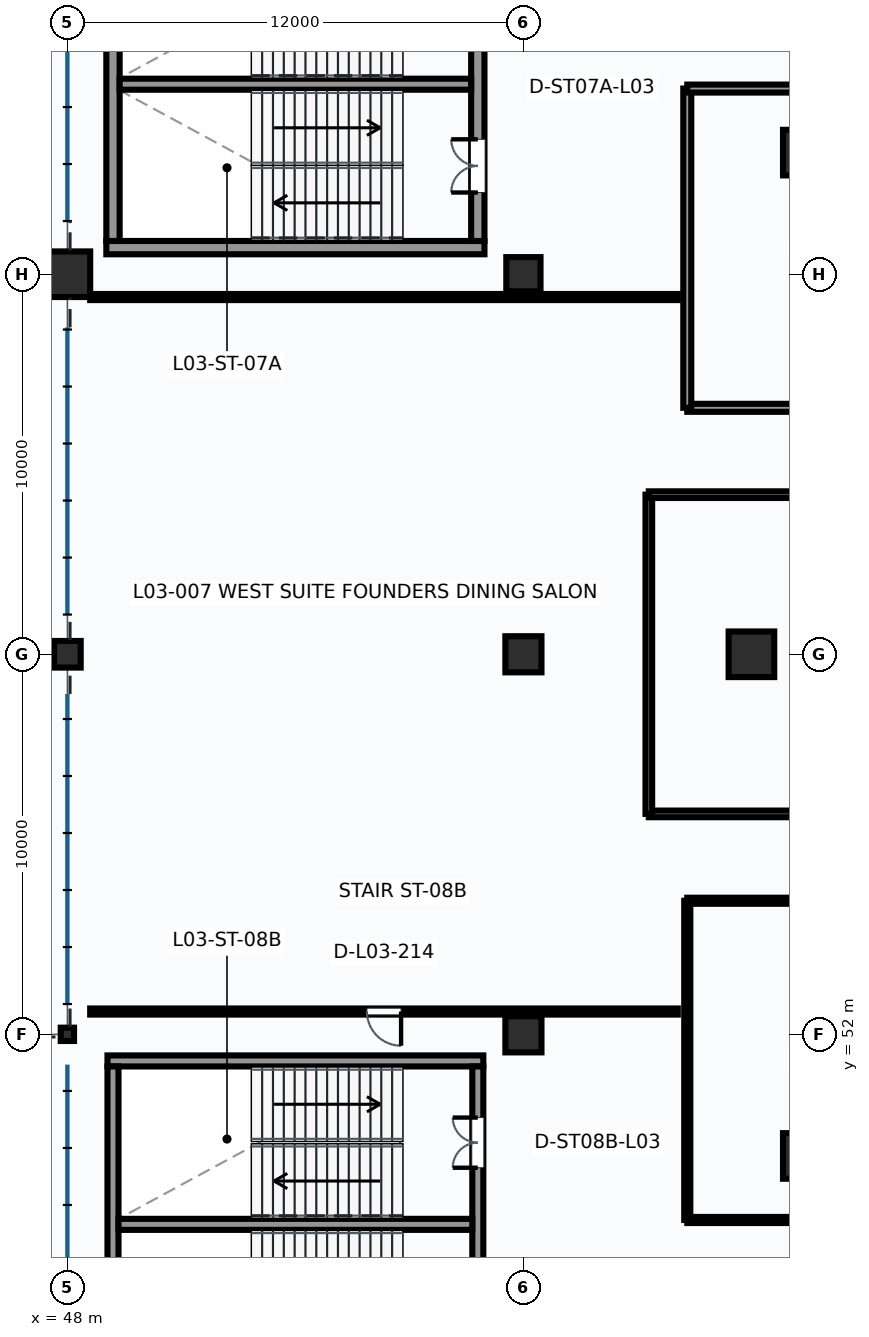
"""IFC4 building model, lengths in metres.
Left out: names, types, materials, properties, quantities, classifications, styles, units other than length and angle.
Written with IfcOpenShell. Run it as: python <this file> out.ifc"""

import sys

from ifc_helpers import new_model, si_unit, direction, frame, frame_2d, origin, origin_2d, place, context, subcontext, project, spatial, rectangle, hollow_rectangle, circle, extrude, element, fill, save


model = new_model("IFC4")
c1 = context("Model", 3, precision=1e-05, world=origin(), true_north=direction((0.0, 1.0)))
c2 = subcontext(c1, "Body", "Model", "MODEL_VIEW")
j1 = project(units=[si_unit("LENGTHUNIT", "METRE"), si_unit("PLANEANGLEUNIT", "RADIAN")], contexts=[c1])
p1 = place(None, origin())
s1 = spatial("IfcSite", under=j1, at=p1, CompositionType="ELEMENT")
p2 = place(p1, origin())
s2 = spatial("IfcBuilding", under=s1, at=p2, CompositionType="ELEMENT")
p3 = place(p2, frame((0.0, 0.0, 14.7)))
s3 = spatial("IfcBuildingStorey", under=s2, at=p3, CompositionType="ELEMENT", Elevation=14.7)
p4 = place(p3, frame((48.0, 52.0, 0.0), z_axis=(0.0, 0.0, 1.0), x_axis=(1.0, 0.0, 0.0)))
e1 = element("IfcColumn", 1, at=p4, inside=s3, PredefinedType="COLUMN", context=c2, shape_type="SweptSolid", body=[
    extrude(hollow_rectangle(XDim=0.35, YDim=0.35, WallThickness=0.016, InnerFilletRadius=0.016, OuterFilletRadius=0.032, at=origin_2d()), origin(), (0.0, 0.0, 1.0), 4.5),
])
p5 = place(p3, frame((48.0, 62.0, 0.0), z_axis=(0.0, 0.0, 1.0), x_axis=(1.0, 0.0, 0.0)))
e2 = element("IfcColumn", 2, at=p5, inside=s3, PredefinedType="COLUMN", context=c2, shape_type="SweptSolid", body=[
    extrude(circle(Radius=0.35, at=origin_2d()), origin(), (0.0, 0.0, 1.0), 4.5),
])
p6 = place(p3, frame((48.0, 72.0, 0.0), z_axis=(0.0, 0.0, 1.0), x_axis=(1.0, 0.0, 0.0)))
e3 = element("IfcColumn", 3, at=p6, inside=s3, PredefinedType="COLUMN", context=c2, shape_type="SweptSolid", body=[
    extrude(rectangle(XDim=1.2, YDim=1.2, at=origin_2d()), origin(), (0.0, 0.0, 1.0), 4.5),
])
for number, where, z_axis, x_axis in (
    (4, (60.0, 52.0, 0.0), (0.0, 0.0, 1.0), (1.0, 0.0, 0.0)),
    (5, (60.0, 62.0, 0.0), (0.0, 0.0, 1.0), (1.0, 0.0, 0.0)),
):
    element("IfcColumn", number, at=place(p3, frame(where, z_axis=z_axis, x_axis=x_axis)), inside=s3, PredefinedType="COLUMN", context=c2, shape_type="SweptSolid", body=[
        extrude(rectangle(XDim=0.95, YDim=0.95, at=origin_2d()), origin(), (0.0, 0.0, 1.0), 4.5),
    ])
p7 = place(p3, frame((60.0, 72.0, 0.0), z_axis=(0.0, 0.0, 1.0), x_axis=(1.0, 0.0, 0.0)))
e6 = element("IfcColumn", 6, at=p7, inside=s3, PredefinedType="COLUMN", context=c2, shape_type="SweptSolid", body=[
    extrude(circle(Radius=0.45, at=origin_2d()), origin(), (0.0, 0.0, 1.0), 4.5),
])
for number, where, z_axis, x_axis in (
    (7, (67.431, 75.2, 0.0), (0.0, 0.0, 1.0), (1.0, 0.0, 0.0)),
    (8, (66.0, 62.0, 0.0), (0.0, 0.0, 1.0), (1.0, 0.0, 0.0)),
    (9, (67.431, 48.8, 0.0), (0.0, 0.0, 1.0), (1.0, 0.0, 0.0)),
):
    element("IfcColumn", number, at=place(p3, frame(where, z_axis=z_axis, x_axis=x_axis)), inside=s3, PredefinedType="COLUMN", context=c2, shape_type="SweptSolid", body=[
        extrude(rectangle(XDim=1.2, YDim=1.2, at=origin_2d()), origin(), (0.0, 0.0, 1.0), 4.5),
    ])
p8 = place(p3, frame((49.025, 72.7, 0.0), z_axis=(0.0, 0.0, 1.0), x_axis=(1.0, 0.0, 0.0)))
e10 = element("IfcWall", 10, at=p8, inside=s3, PredefinedType="SHEAR", context=c2, shape_type="SweptSolid", body=[
    extrude(rectangle(XDim=9.95, YDim=0.35, at=frame_2d((4.975, 0.0))), origin(), (0.0, 0.0, 1.0), 4.5),
])
p9 = place(p3, frame((49.2, 72.875, 0.0), z_axis=(0.0, 0.0, 1.0), x_axis=(0.0, 1.0, 0.0)))
e11 = element("IfcWall", 11, at=p9, inside=s3, PredefinedType="SHEAR", context=c2, shape_type="SweptSolid", body=[
    extrude(rectangle(XDim=8.25, YDim=0.35, at=frame_2d((4.125, 0.0))), origin(), (0.0, 0.0, 1.0), 4.5),
])
p10 = place(p3, frame((58.8, 72.875, 0.0), z_axis=(0.0, 0.0, 1.0), x_axis=(0.0, 1.0, 0.0)))
e12 = element("IfcWall", 12, at=p10, inside=s3, PredefinedType="SHEAR", context=c2, shape_type="SweptSolid", body=[
    extrude(rectangle(XDim=8.25, YDim=0.35, at=frame_2d((4.125, 0.0))), origin(), (0.0, 0.0, 1.0), 4.5),
])
p11 = place(p10, frame((1.275, 0.0, 0.0)))
e13 = element("IfcOpeningElement", 13, at=p11, cuts=e12, PredefinedType="OPENING", context=c2, shape_type="SweptSolid", body=[
    extrude(rectangle(XDim=1.4, YDim=2.2, at=frame_2d((0.7, 1.1))), frame((0.0, 0.185, 0.0), z_axis=(0.0, -1.0, 0.0), x_axis=(1.0, 0.0, 0.0)), (0.0, 0.0, 1.0), 0.37),
])
p12 = place(p10, frame((5.615, 0.0, 0.0)))
e14 = element("IfcOpeningElement", 14, at=p12, cuts=e12, PredefinedType="OPENING", context=c2, shape_type="SweptSolid", body=[
    extrude(rectangle(XDim=1.32, YDim=2.2, at=frame_2d((0.66, 1.1))), frame((0.0, 0.185, 0.0), z_axis=(0.0, -1.0, 0.0), x_axis=(1.0, 0.0, 0.0)), (0.0, 0.0, 1.0), 0.37),
])
p13 = place(p3, frame((49.375, 77.0, 0.0), z_axis=(0.0, 0.0, 1.0), x_axis=(1.0, 0.0, 0.0)))
e15 = element("IfcWall", 15, at=p13, inside=s3, PredefinedType="SHEAR", context=c2, shape_type="SweptSolid", body=[
    extrude(rectangle(XDim=9.25, YDim=0.29, at=frame_2d((4.625, 0.0))), origin(), (0.0, 0.0, 1.0), 4.5),
])
p14 = place(p3, frame((49.055, 51.3, 0.0), z_axis=(0.0, 0.0, 1.0), x_axis=(1.0, 0.0, 0.0)))
e16 = element("IfcWall", 16, at=p14, inside=s3, PredefinedType="SHEAR", context=c2, shape_type="SweptSolid", body=[
    extrude(rectangle(XDim=9.89, YDim=0.29, at=frame_2d((4.945, 0.0))), origin(), (0.0, 0.0, 1.0), 4.5),
])
p15 = place(p3, frame((49.2, 42.845, 0.0), z_axis=(0.0, 0.0, 1.0), x_axis=(0.0, 1.0, 0.0)))
e17 = element("IfcWall", 17, at=p15, inside=s3, PredefinedType="SHEAR", context=c2, shape_type="SweptSolid", body=[
    extrude(rectangle(XDim=8.31, YDim=0.29, at=frame_2d((4.155, 0.0))), origin(), (0.0, 0.0, 1.0), 4.5),
])
p16 = place(p3, frame((58.8, 42.845, 0.0), z_axis=(0.0, 0.0, 1.0), x_axis=(0.0, 1.0, 0.0)))
e18 = element("IfcWall", 18, at=p16, inside=s3, PredefinedType="SHEAR", context=c2, shape_type="SweptSolid", body=[
    extrude(rectangle(XDim=8.31, YDim=0.29, at=frame_2d((4.155, 0.0))), origin(), (0.0, 0.0, 1.0), 4.5),
])
p17 = place(p16, frame((1.305, 0.0, 0.0)))
e19 = element("IfcOpeningElement", 19, at=p17, cuts=e18, PredefinedType="OPENING", context=c2, shape_type="SweptSolid", body=[
    extrude(rectangle(XDim=1.4, YDim=2.2, at=frame_2d((0.7, 1.1))), frame((0.0, 0.155, 0.0), z_axis=(0.0, -1.0, 0.0), x_axis=(1.0, 0.0, 0.0)), (0.0, 0.0, 1.0), 0.31),
])
p18 = place(p16, frame((5.645, 0.0, 0.0)))
e20 = element("IfcOpeningElement", 20, at=p18, cuts=e18, PredefinedType="OPENING", context=c2, shape_type="SweptSolid", body=[
    extrude(rectangle(XDim=1.32, YDim=2.2, at=frame_2d((0.66, 1.1))), frame((0.0, 0.155, 0.0), z_axis=(0.0, -1.0, 0.0), x_axis=(1.0, 0.0, 0.0)), (0.0, 0.0, 1.0), 0.31),
])
p19 = place(p3, frame((49.345, 47.0, 0.0), z_axis=(0.0, 0.0, 1.0), x_axis=(1.0, 0.0, 0.0)))
e21 = element("IfcWall", 21, at=p19, inside=s3, PredefinedType="SHEAR", context=c2, shape_type="SweptSolid", body=[
    extrude(rectangle(XDim=9.31, YDim=0.29, at=frame_2d((4.655, 0.0))), origin(), (0.0, 0.0, 1.0), 4.5),
])
p20 = place(p3, frame((74.712, 68.485, 0.0), z_axis=(0.0, 0.0, 1.0), x_axis=(-1.0, 0.0, 0.0)))
e22 = element("IfcWall", 22, at=p20, inside=s3, PredefinedType="SOLIDWALL", context=c2, shape_type="SweptSolid", body=[
    extrude(rectangle(XDim=10.4, YDim=0.21, at=frame_2d((5.2, 0.0))), origin(), (0.0, 0.0, 1.0), 2.679),
])
p21 = place(p20, frame((4.525, 0.0, 0.0)))
e23 = element("IfcOpeningElement", 23, at=p21, cuts=e22, PredefinedType="OPENING", context=c2, shape_type="SweptSolid", body=[
    extrude(rectangle(XDim=1.35, YDim=2.3, at=frame_2d((0.675, 1.15))), frame((0.0, 0.115, 0.0), z_axis=(0.0, -1.0, 0.0), x_axis=(1.0, 0.0, 0.0)), (0.0, 0.0, 1.0), 0.23),
])
p22 = place(p3, frame((64.312, 68.485, 0.0), z_axis=(0.0, 0.0, 1.0), x_axis=(0.0, 1.0, 0.0)))
e24 = element("IfcWall", 24, at=p22, inside=s3, PredefinedType="SOLIDWALL", context=c2, shape_type="SweptSolid", body=[
    extrude(rectangle(XDim=8.4, YDim=0.21, at=frame_2d((4.2, 0.0))), origin(), (0.0, 0.0, 1.0), 4.16),
])
p23 = place(p3, frame((64.312, 76.885, 0.0), z_axis=(0.0, 0.0, 1.0), x_axis=(1.0, 0.0, 0.0)))
e25 = element("IfcWall", 25, at=p23, inside=s3, PredefinedType="SOLIDWALL", context=c2, shape_type="SweptSolid", body=[
    extrude(rectangle(XDim=10.4, YDim=0.21, at=frame_2d((5.2, 0.0))), origin(), (0.0, 0.0, 1.0), 2.679),
])
p24 = place(p3, frame((73.7, 57.8, 0.0), z_axis=(0.0, 0.0, 1.0), x_axis=(-1.0, 0.0, 0.0)))
e26 = element("IfcWall", 26, at=p24, inside=s3, PredefinedType="PARTITIONING", context=c2, shape_type="SweptSolid", body=[
    extrude(rectangle(XDim=10.4, YDim=0.175, at=frame_2d((5.2, 0.0))), origin(), (0.0, 0.0, 1.0), 2.53),
])
p25 = place(p24, frame((4.475, 0.0, 0.0)))
e27 = element("IfcOpeningElement", 27, at=p25, cuts=e26, PredefinedType="OPENING", context=c2, shape_type="SweptSolid", body=[
    extrude(rectangle(XDim=1.45, YDim=2.3, at=frame_2d((0.725, 1.15))), frame((0.0, 0.097, 0.0), z_axis=(0.0, -1.0, 0.0), x_axis=(1.0, 0.0, 0.0)), (0.0, 0.0, 1.0), 0.195),
])
p26 = place(p3, frame((63.3, 57.8, 0.0), z_axis=(0.0, 0.0, 1.0), x_axis=(0.0, 1.0, 0.0)))
e28 = element("IfcWall", 28, at=p26, inside=s3, PredefinedType="PARTITIONING", context=c2, shape_type="SweptSolid", body=[
    extrude(rectangle(XDim=8.4, YDim=0.175, at=frame_2d((4.2, 0.0))), origin(), (0.0, 0.0, 1.0), 4.16),
])
p27 = place(p3, frame((63.3, 66.2, 0.0), z_axis=(0.0, 0.0, 1.0), x_axis=(1.0, 0.0, 0.0)))
e29 = element("IfcWall", 29, at=p27, inside=s3, PredefinedType="PARTITIONING", context=c2, shape_type="SweptSolid", body=[
    extrude(rectangle(XDim=10.4, YDim=0.175, at=frame_2d((5.2, 0.0))), origin(), (0.0, 0.0, 1.0), 2.679),
])
p28 = place(p3, frame((74.712, 47.115, 0.0), z_axis=(0.0, 0.0, 1.0), x_axis=(-1.0, 0.0, 0.0)))
e30 = element("IfcWall", 30, at=p28, inside=s3, PredefinedType="PARTITIONING", context=c2, shape_type="SweptSolid", body=[
    extrude(rectangle(XDim=10.4, YDim=0.16, at=frame_2d((5.2, 0.0))), origin(), (0.0, 0.0, 1.0), 2.53),
])
p29 = place(p28, frame((3.177, 0.0, 0.0)))
e31 = element("IfcOpeningElement", 31, at=p29, cuts=e30, PredefinedType="OPENING", context=c2, shape_type="SweptSolid", body=[
    extrude(rectangle(XDim=1.55, YDim=2.3, at=frame_2d((0.775, 1.15))), frame((0.0, 0.09, 0.0), z_axis=(0.0, -1.0, 0.0), x_axis=(1.0, 0.0, 0.0)), (0.0, 0.0, 1.0), 0.18),
])
p30 = place(p3, frame((64.312, 47.115, 0.0), z_axis=(0.0, 0.0, 1.0), x_axis=(0.0, 1.0, 0.0)))
e32 = element("IfcWall", 32, at=p30, inside=s3, PredefinedType="PARTITIONING", context=c2, shape_type="SweptSolid", body=[
    extrude(rectangle(XDim=8.4, YDim=0.16, at=frame_2d((4.2, 0.0))), origin(), (0.0, 0.0, 1.0), 4.16),
])
p31 = place(p3, frame((64.312, 55.515, 0.0), z_axis=(0.0, 0.0, 1.0), x_axis=(1.0, 0.0, 0.0)))
e33 = element("IfcWall", 33, at=p31, inside=s3, PredefinedType="PARTITIONING", context=c2, shape_type="SweptSolid", body=[
    extrude(rectangle(XDim=10.4, YDim=0.16, at=frame_2d((5.2, 0.0))), origin(), (0.0, 0.0, 1.0), 2.53),
])
p32 = place(p3, frame((64.062, 52.6, 0.0), z_axis=(0.0, 0.0, 1.0), x_axis=(-1.0, 0.0, 0.0)))
e34 = element("IfcWall", 34, at=p32, inside=s3, PredefinedType="PARTITIONING", context=c2, shape_type="SweptSolid", body=[
    extrude(rectangle(XDim=15.462, YDim=0.16, at=frame_2d((7.731, 0.0))), origin(), (0.0, 0.0, 1.0), 3.529),
])
p33 = place(p32, frame((7.281, 0.0, 0.0)))
e35 = element("IfcOpeningElement", 35, at=p33, cuts=e34, PredefinedType="OPENING", context=c2, shape_type="SweptSolid", body=[
    extrude(rectangle(XDim=0.9, YDim=2.1, at=frame_2d((0.45, 1.05))), frame((0.0, 0.09, 0.0), z_axis=(0.0, -1.0, 0.0), x_axis=(1.0, 0.0, 0.0)), (0.0, 0.0, 1.0), 0.18),
])
p34 = place(p3, frame((48.6, 71.4, 0.0), z_axis=(0.0, 0.0, 1.0), x_axis=(1.0, 0.0, 0.0)))
e36 = element("IfcWall", 36, at=p34, inside=s3, PredefinedType="PARTITIONING", context=c2, shape_type="SweptSolid", body=[
    extrude(rectangle(XDim=15.462, YDim=0.16, at=frame_2d((7.731, 0.0))), origin(), (0.0, 0.0, 1.0), 3.524),
])
p35 = place(p11, origin())
e37 = element("IfcDoor", 37, at=p35, inside=s3, OperationType="DOUBLE_DOOR_SINGLE_SWING", PredefinedType="DOOR", context=c2, shape_type="SweptSolid", body=[
    extrude(rectangle(XDim=1.4, YDim=2.2, at=frame_2d((0.7, 1.1))), frame((0.0, 0.025, 0.0), z_axis=(0.0, -1.0, 0.0), x_axis=(1.0, 0.0, 0.0)), (0.0, 0.0, 1.0), 0.05),
])
fill(e13, e37)
p36 = place(p18, origin())
e38 = element("IfcDoor", 38, at=p36, inside=s3, OperationType="DOUBLE_DOOR_SINGLE_SWING", PredefinedType="DOOR", context=c2, shape_type="SweptSolid", body=[
    extrude(rectangle(XDim=1.32, YDim=2.2, at=frame_2d((0.66, 1.1))), frame((0.0, 0.025, 0.0), z_axis=(0.0, -1.0, 0.0), x_axis=(1.0, 0.0, 0.0)), (0.0, 0.0, 1.0), 0.05),
])
fill(e20, e38)
p37 = place(p33, origin())
e39 = element("IfcDoor", 39, at=p37, inside=s3, OperationType="SINGLE_SWING_LEFT", PredefinedType="DOOR", context=c2, shape_type="SweptSolid", body=[
    extrude(rectangle(XDim=0.9, YDim=2.1, at=frame_2d((0.45, 1.05))), frame((0.0, 0.025, 0.0), z_axis=(0.0, -1.0, 0.0), x_axis=(1.0, 0.0, 0.0)), (0.0, 0.0, 1.0), 0.05),
])
fill(e35, e39)
save(model, sys.argv[1])
